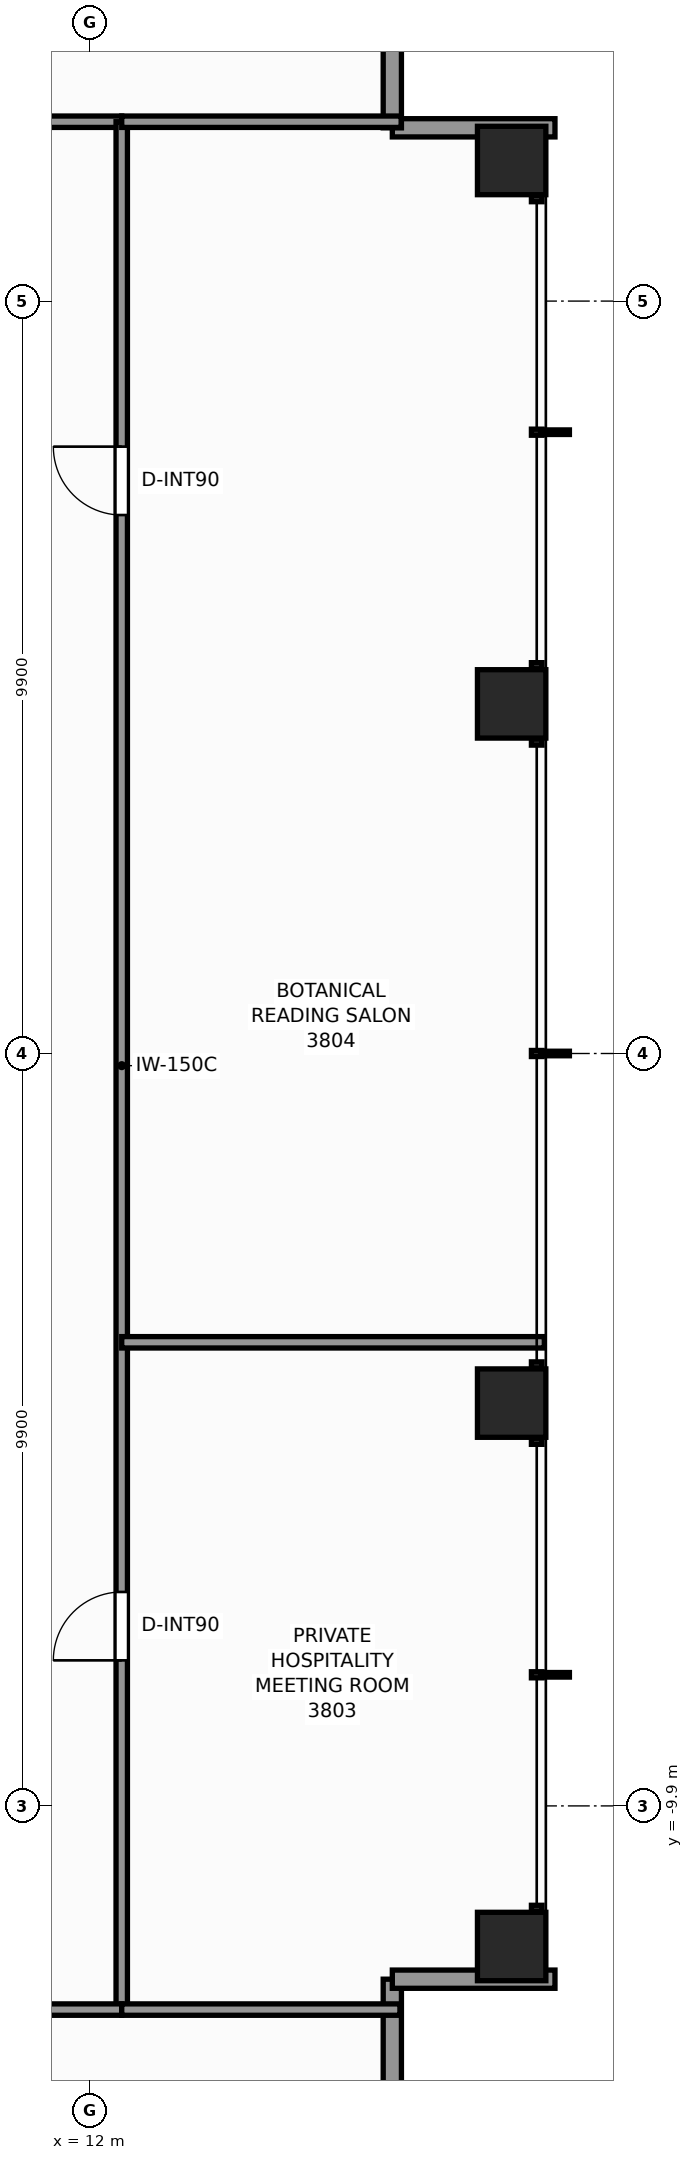
"""IFC4 building model, lengths in metres.
Left out: names, types, materials, properties, quantities, classifications, styles, units other than length and angle.
Written with IfcOpenShell. Run it as: python <this file> out.ifc"""

import sys

from ifc_helpers import new_model, si_unit, direction, frame, frame_2d, origin, origin_2d, place, context, subcontext, project, spatial, rectangle, extrude, element, fill, save


model = new_model("IFC4")
c1 = context("Model", 3, precision=1e-05, world=origin(), true_north=direction((0.0, 1.0)))
c2 = subcontext(c1, "Body", "Model", "MODEL_VIEW")
j1 = project(units=[si_unit("LENGTHUNIT", "METRE"), si_unit("PLANEANGLEUNIT", "RADIAN")], contexts=[c1])
p1 = place(None, origin())
s1 = spatial("IfcSite", under=j1, at=p1, CompositionType="ELEMENT")
p2 = place(p1, origin())
s2 = spatial("IfcBuilding", under=s1, at=p2, CompositionType="ELEMENT")
p3 = place(p2, frame((0.0, 0.0, 131.6)))
s3 = spatial("IfcBuildingStorey", under=s2, at=p3, CompositionType="ELEMENT", Elevation=131.6)
for number, where, z_axis, x_axis in (
    (1, (17.55, -11.75, 0.0), (0.0, 0.0, 1.0), (1.0, 0.0, 0.0)),
    (2, (17.55, -4.6, 0.0), (0.0, 0.0, 1.0), (1.0, 0.0, 0.0)),
    (3, (17.55, 4.6, 0.0), (0.0, 0.0, 1.0), (1.0, 0.0, 0.0)),
    (4, (17.55, 11.75, 0.0), (0.0, 0.0, 1.0), (1.0, 0.0, 0.0)),
):
    element("IfcColumn", number, at=place(p3, frame(where, z_axis=z_axis, x_axis=x_axis)), inside=s3, PredefinedType="COLUMN", context=c2, shape_type="SweptSolid", body=[
        extrude(rectangle(XDim=0.9, YDim=0.9, at=origin_2d()), origin(), (0.0, 0.0, 1.0), 3.3),
    ])
for number, where, z_axis, x_axis in (
    (5, (15.98, -12.18, 0.0), (0.0, 0.0, 1.0), (0.0, -1.0, 0.0)),
    (6, (18.12, -12.18, 0.0), (0.0, 0.0, 1.0), (-1.0, 0.0, 0.0)),
    (7, (15.98, 12.18, 0.0), (0.0, 0.0, 1.0), (1.0, 0.0, 0.0)),
    (8, (15.98, 14.32, 0.0), (0.0, 0.0, 1.0), (0.0, -1.0, 0.0)),
):
    element("IfcWall", number, at=place(p3, frame(where, z_axis=z_axis, x_axis=x_axis)), inside=s3, PredefinedType="STANDARD", context=c2, shape_type="SweptSolid", body=[
        extrude(rectangle(XDim=2.14, YDim=0.24, at=frame_2d((1.07, 0.0))), origin(), (0.0, 0.0, 1.0), 2.479),
    ])
p4 = place(p3, frame((-12.26, 12.26, 0.0), z_axis=(0.0, 0.0, 1.0), x_axis=(1.0, 0.0, 0.0)))
e9 = element("IfcWall", 9, at=p4, inside=s3, PredefinedType="PARTITIONING", context=c2, shape_type="SweptSolid", body=[
    extrude(rectangle(XDim=24.68, YDim=0.15, at=frame_2d((12.34, 0.0))), origin(), (0.0, 0.0, 1.0), 2.312),
])
p5 = place(p4, frame((4.275, 0.0, 0.0)))
e10 = element("IfcOpeningElement", 10, at=p5, cuts=e9, PredefinedType="OPENING", context=c2, shape_type="SweptSolid", body=[
    extrude(rectangle(XDim=0.9, YDim=2.06, at=frame_2d((0.45, 1.03))), frame((0.0, 0.085, 0.0), z_axis=(0.0, -1.0, 0.0), x_axis=(1.0, 0.0, 0.0)), (0.0, 0.0, 1.0), 0.17),
])
p6 = place(p4, frame((19.345, 0.0, 0.0)))
e11 = element("IfcOpeningElement", 11, at=p6, cuts=e9, PredefinedType="OPENING", context=c2, shape_type="SweptSolid", body=[
    extrude(rectangle(XDim=0.9, YDim=2.06, at=frame_2d((0.45, 1.03))), frame((0.0, 0.085, 0.0), z_axis=(0.0, -1.0, 0.0), x_axis=(1.0, 0.0, 0.0)), (0.0, 0.0, 1.0), 0.17),
])
p7 = place(p3, frame((12.42, -12.58, 0.0), z_axis=(0.0, 0.0, 1.0), x_axis=(0.0, 1.0, 0.0)))
e12 = element("IfcWall", 12, at=p7, inside=s3, PredefinedType="PARTITIONING", context=c2, shape_type="SweptSolid", body=[
    extrude(rectangle(XDim=24.84, YDim=0.15, at=frame_2d((12.42, 0.0))), origin(), (0.0, 0.0, 1.0), 2.312),
])
p8 = place(p7, frame((4.595, 0.0, 0.0)))
e13 = element("IfcOpeningElement", 13, at=p8, cuts=e12, PredefinedType="OPENING", context=c2, shape_type="SweptSolid", body=[
    extrude(rectangle(XDim=0.9, YDim=2.06, at=frame_2d((0.45, 1.03))), frame((0.0, 0.085, 0.0), z_axis=(0.0, -1.0, 0.0), x_axis=(1.0, 0.0, 0.0)), (0.0, 0.0, 1.0), 0.17),
])
p9 = place(p7, frame((19.665, 0.0, 0.0)))
e14 = element("IfcOpeningElement", 14, at=p9, cuts=e12, PredefinedType="OPENING", context=c2, shape_type="SweptSolid", body=[
    extrude(rectangle(XDim=0.9, YDim=2.06, at=frame_2d((0.45, 1.03))), frame((0.0, 0.085, 0.0), z_axis=(0.0, -1.0, 0.0), x_axis=(1.0, 0.0, 0.0)), (0.0, 0.0, 1.0), 0.17),
])
p10 = place(p3, frame((-3.65, -12.58, 0.0), z_axis=(0.0, 0.0, 1.0), x_axis=(1.0, 0.0, 0.0)))
e15 = element("IfcWall", 15, at=p10, inside=s3, PredefinedType="PARTITIONING", context=c2, shape_type="SweptSolid", body=[
    extrude(rectangle(XDim=16.07, YDim=0.15, at=frame_2d((8.035, 0.0))), origin(), (0.0, 0.0, 1.0), 2.312),
])
p11 = place(p10, frame((10.735, 0.0, 0.0)))
e16 = element("IfcOpeningElement", 16, at=p11, cuts=e15, PredefinedType="OPENING", context=c2, shape_type="SweptSolid", body=[
    extrude(rectangle(XDim=0.9, YDim=2.06, at=frame_2d((0.45, 1.03))), frame((0.0, 0.085, 0.0), z_axis=(0.0, -1.0, 0.0), x_axis=(1.0, 0.0, 0.0)), (0.0, 0.0, 1.0), 0.17),
])
p12 = place(p3, frame((12.42, -12.58, 0.0), z_axis=(0.0, 0.0, 1.0), x_axis=(1.0, 0.0, 0.0)))
e17 = element("IfcWall", 17, at=p12, inside=s3, PredefinedType="PARTITIONING", context=c2, shape_type="SweptSolid", body=[
    extrude(rectangle(XDim=3.66, YDim=0.15, at=frame_2d((1.83, 0.0))), origin(), (0.0, 0.0, 1.0), 3.1),
])
p13 = place(p3, frame((12.42, 12.26, 0.0), z_axis=(0.0, 0.0, 1.0), x_axis=(1.0, 0.0, 0.0)))
e18 = element("IfcWall", 18, at=p13, inside=s3, PredefinedType="PARTITIONING", context=c2, shape_type="SweptSolid", body=[
    extrude(rectangle(XDim=3.676, YDim=0.15, at=frame_2d((1.838, 0.0))), origin(), (0.0, 0.0, 1.0), 3.1),
])
p14 = place(p3, frame((12.42, -3.8, 0.0), z_axis=(0.0, 0.0, 1.0), x_axis=(1.0, 0.0, 0.0)))
e19 = element("IfcWall", 19, at=p14, inside=s3, PredefinedType="PARTITIONING", context=c2, shape_type="SweptSolid", body=[
    extrude(rectangle(XDim=5.56, YDim=0.15, at=frame_2d((2.78, 0.0))), origin(), (0.0, 0.0, 1.0), 2.469),
])
p15 = place(p8, origin())
e20 = element("IfcDoor", 20, at=p15, inside=s3, OperationType="SINGLE_SWING_LEFT", PredefinedType="DOOR", context=c2, shape_type="SweptSolid", body=[
    extrude(rectangle(XDim=0.9, YDim=2.06, at=frame_2d((0.45, 1.03))), frame((0.0, 0.025, 0.0), z_axis=(0.0, -1.0, 0.0), x_axis=(1.0, 0.0, 0.0)), (0.0, 0.0, 1.0), 0.05),
])
fill(e13, e20)
p16 = place(p9, origin())
e21 = element("IfcDoor", 21, at=p16, inside=s3, OperationType="SINGLE_SWING_RIGHT", PredefinedType="DOOR", context=c2, shape_type="SweptSolid", body=[
    extrude(rectangle(XDim=0.9, YDim=2.06, at=frame_2d((0.45, 1.03))), frame((0.0, 0.025, 0.0), z_axis=(0.0, -1.0, 0.0), x_axis=(1.0, 0.0, 0.0)), (0.0, 0.0, 1.0), 0.05),
])
fill(e14, e21)
save(model, sys.argv[1])
